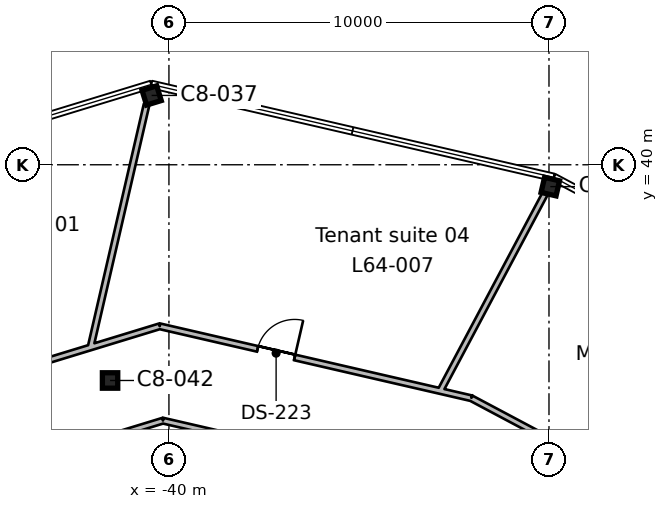
"""IFC4 building model, lengths in metres.
Left out: names, types, materials, properties, quantities, classifications, styles, units other than length and angle.
Written with IfcOpenShell. Run it as: python <this file> out.ifc"""

import sys

from ifc_helpers import new_model, si_unit, direction, frame, frame_2d, origin, origin_2d, place, context, subcontext, project, spatial, rectangle, i_section, extrude, element, fill, save


model = new_model("IFC4")
c1 = context("Model", 3, precision=1e-05, world=origin(), true_north=direction((0.0, 1.0)))
c2 = subcontext(c1, "Body", "Model", "MODEL_VIEW")
j1 = project(units=[si_unit("LENGTHUNIT", "METRE"), si_unit("PLANEANGLEUNIT", "RADIAN")], contexts=[c1])
p1 = place(None, origin())
s1 = spatial("IfcSite", under=j1, at=p1, CompositionType="ELEMENT")
p2 = place(p1, origin())
s2 = spatial("IfcBuilding", under=s1, at=p2, CompositionType="ELEMENT")
p3 = place(p2, frame((0.0, 0.0, 285.3)))
s3 = spatial("IfcBuildingStorey", under=s2, at=p3, CompositionType="ELEMENT", Elevation=285.3)
for number, where, z_axis, x_axis in (
    (1, (-41.549, 34.324, 0.0), (0.0, 0.0, 1.0), (1.0, 0.0, 0.0)),
    (2, (-29.965, 39.425, 0.0), (0.0, 0.0, 1.0), (-0.974, 0.225, 0.0)),
    (3, (-40.455, 41.824, 0.0), (0.0, 0.0, 1.0), (-0.956, -0.292, 0.0)),
):
    element("IfcColumn", number, at=place(p3, frame(where, z_axis=z_axis, x_axis=x_axis)), inside=s3, PredefinedType="COLUMN", context=c2, shape_type="SweptSolid", body=[
        extrude(i_section(OverallWidth=0.404, OverallDepth=0.406, WebThickness=0.027, FlangeThickness=0.044, FilletRadius=0.015, at=origin_2d()), origin(), (0.0, 0.0, 1.0), 3.9),
    ])
p4 = place(p3, frame((-42.972, 34.916, 0.0), z_axis=(0.0, 0.0, 1.0), x_axis=(-0.956321861231, -0.292315750056, 0.0)))
e4 = element("IfcWall", 4, at=p4, inside=s3, PredefinedType="PARTITIONING", context=c2, shape_type="SweptSolid", body=[
    extrude(rectangle(XDim=4.721, YDim=0.15, at=frame_2d((2.361, 0.0))), origin(), (0.0, 0.0, 1.0), 3.54),
])
p5 = place(p4, frame((1.85, 0.0, 0.0)))
e5 = element("IfcOpeningElement", 5, at=p5, cuts=e4, PredefinedType="OPENING", context=c2, shape_type="SweptSolid", body=[
    extrude(rectangle(XDim=1.0, YDim=2.1, at=frame_2d((0.5, 1.05))), frame((0.0, 0.085, 0.0), z_axis=(0.0, -1.0, 0.0), x_axis=(1.0, 0.0, 0.0)), (0.0, 0.0, 1.0), 0.17),
])
p6 = place(p3, frame((-46.17, 31.429, 0.0), z_axis=(0.0, 0.0, 1.0), x_axis=(0.956313885215, 0.292341842616, 0.0)))
e6 = element("IfcWall", 6, at=p6, inside=s3, PredefinedType="PARTITIONING", context=c2, shape_type="SweptSolid", body=[
    extrude(rectangle(XDim=6.288, YDim=0.15, at=frame_2d((3.144, 0.0))), origin(), (0.0, 0.0, 1.0), 3.54),
])
p7 = place(p3, frame((-40.157, 33.267, 0.0), z_axis=(0.0, 0.0, 1.0), x_axis=(0.974363587665, -0.224979107993, 0.0)))
e7 = element("IfcWall", 7, at=p7, inside=s3, PredefinedType="PARTITIONING", context=c2, shape_type="SweptSolid", body=[
    extrude(rectangle(XDim=7.454, YDim=0.15, at=frame_2d((3.727, 0.0))), origin(), (0.0, 0.0, 1.0), 3.54),
])
p8 = place(p3, frame((-42.972, 34.916, 0.0), z_axis=(0.0, 0.0, 1.0), x_axis=(0.956388481043, 0.292097711954, 0.0)))
e8 = element("IfcWall", 8, at=p8, inside=s3, PredefinedType="PARTITIONING", context=c2, shape_type="SweptSolid", body=[
    extrude(rectangle(XDim=0.975, YDim=0.15, at=frame_2d((0.488, 0.0))), origin(), (0.0, 0.0, 1.0), 3.54),
])
p9 = place(p3, frame((-40.59, 41.575, 0.0), z_axis=(0.0, 0.0, 1.0), x_axis=(-0.224916684579, -0.974377999032, 0.0)))
e9 = element("IfcWall", 9, at=p9, inside=s3, PredefinedType="PARTITIONING", context=c2, shape_type="SweptSolid", body=[
    extrude(rectangle(XDim=6.549, YDim=0.15, at=frame_2d((3.274, 0.0))), origin(), (0.0, 0.0, 1.0), 3.54),
])
p10 = place(p3, frame((-34.208, 34.357, 0.0), z_axis=(0.0, 0.0, 1.0), x_axis=(-0.974377242452, 0.224919962192, 0.0)))
e10 = element("IfcWall", 10, at=p10, inside=s3, PredefinedType="PARTITIONING", context=c2, shape_type="SweptSolid", body=[
    extrude(rectangle(XDim=6.194, YDim=0.15, at=frame_2d((3.097, 0.0))), origin(), (0.0, 0.0, 1.0), 3.54),
])
p11 = place(p10, frame((2.55, 0.0, 0.0)))
e11 = element("IfcOpeningElement", 11, at=p11, cuts=e10, PredefinedType="OPENING", context=c2, shape_type="SweptSolid", body=[
    extrude(rectangle(XDim=1.0, YDim=2.1, at=frame_2d((0.5, 1.05))), frame((0.0, 0.085, 0.0), z_axis=(0.0, -1.0, 0.0), x_axis=(1.0, 0.0, 0.0)), (0.0, 0.0, 1.0), 0.17),
])
p12 = place(p3, frame((-40.243, 35.75, 0.0), z_axis=(0.0, 0.0, 1.0), x_axis=(-0.956314227535, -0.292340722812, 0.0)))
e12 = element("IfcWall", 12, at=p12, inside=s3, PredefinedType="PARTITIONING", context=c2, shape_type="SweptSolid", body=[
    extrude(rectangle(XDim=1.878, YDim=0.15, at=frame_2d((0.939, 0.0))), origin(), (0.0, 0.0, 1.0), 3.54),
])
p13 = place(p3, frame((-34.208, 34.357, 0.0), z_axis=(0.0, 0.0, 1.0), x_axis=(0.974467175192, -0.224530007959, 0.0)))
e13 = element("IfcWall", 13, at=p13, inside=s3, PredefinedType="PARTITIONING", context=c2, shape_type="SweptSolid", body=[
    extrude(rectangle(XDim=1.407, YDim=0.15, at=frame_2d((0.704, 0.0))), origin(), (0.0, 0.0, 1.0), 3.54),
])
p14 = place(p3, frame((-30.098, 39.247, 0.0), z_axis=(0.0, 0.0, 1.0), x_axis=(-0.469421875668, -0.882974010175, 0.0)))
e14 = element("IfcWall", 14, at=p14, inside=s3, PredefinedType="PARTITIONING", context=c2, shape_type="SweptSolid", body=[
    extrude(rectangle(XDim=5.891, YDim=0.15, at=frame_2d((2.945, 0.0))), origin(), (0.0, 0.0, 1.0), 3.54),
])
p15 = place(p3, frame((-32.046, 33.858, 0.0), z_axis=(0.0, 0.0, 1.0), x_axis=(-0.97423893818, 0.225518272727, 0.0)))
e15 = element("IfcWall", 15, at=p15, inside=s3, PredefinedType="PARTITIONING", context=c2, shape_type="SweptSolid", body=[
    extrude(rectangle(XDim=0.812, YDim=0.15, at=frame_2d((0.406, 0.0))), origin(), (0.0, 0.0, 1.0), 3.54),
])
p16 = place(p3, frame((-32.046, 33.858, 0.0), z_axis=(0.0, 0.0, 1.0), x_axis=(0.882950883098, -0.469465374694, 0.0)))
e16 = element("IfcWall", 16, at=p16, inside=s3, PredefinedType="PARTITIONING", context=c2, shape_type="SweptSolid", body=[
    extrude(rectangle(XDim=36.294, YDim=0.15, at=frame_2d((18.147, 0.0))), origin(), (0.0, 0.0, 1.0), 3.54),
])
p17 = place(p16, frame((17.65, 0.0, 0.0)))
e17 = element("IfcOpeningElement", 17, at=p17, cuts=e16, PredefinedType="OPENING", context=c2, shape_type="SweptSolid", body=[
    extrude(rectangle(XDim=1.0, YDim=2.1, at=frame_2d((0.5, 1.05))), frame((0.0, 0.085, 0.0), z_axis=(0.0, -1.0, 0.0), x_axis=(1.0, 0.0, 0.0)), (0.0, 0.0, 1.0), 0.17),
])
p18 = place(p16, frame((9.25, 0.0, 0.0)))
e18 = element("IfcOpeningElement", 18, at=p18, cuts=e16, PredefinedType="OPENING", context=c2, shape_type="SweptSolid", body=[
    extrude(rectangle(XDim=1.0, YDim=2.1, at=frame_2d((0.5, 1.05))), frame((0.0, 0.085, 0.0), z_axis=(0.0, -1.0, 0.0), x_axis=(1.0, 0.0, 0.0)), (0.0, 0.0, 1.0), 0.17),
])
p19 = place(p11, frame((1.0, 0.0, 0.0), z_axis=(0.0, 0.0, 1.0), x_axis=(-1.0, 0.0, 0.0)))
e19 = element("IfcDoor", 19, at=p19, inside=s3, OperationType="SINGLE_SWING_RIGHT", PredefinedType="DOOR", context=c2, shape_type="SweptSolid", body=[
    extrude(rectangle(XDim=1.0, YDim=2.1, at=frame_2d((0.5, 1.05))), frame((0.0, 0.025, 0.0), z_axis=(0.0, -1.0, 0.0), x_axis=(1.0, 0.0, 0.0)), (0.0, 0.0, 1.0), 0.05),
])
fill(e11, e19)
save(model, sys.argv[1])
